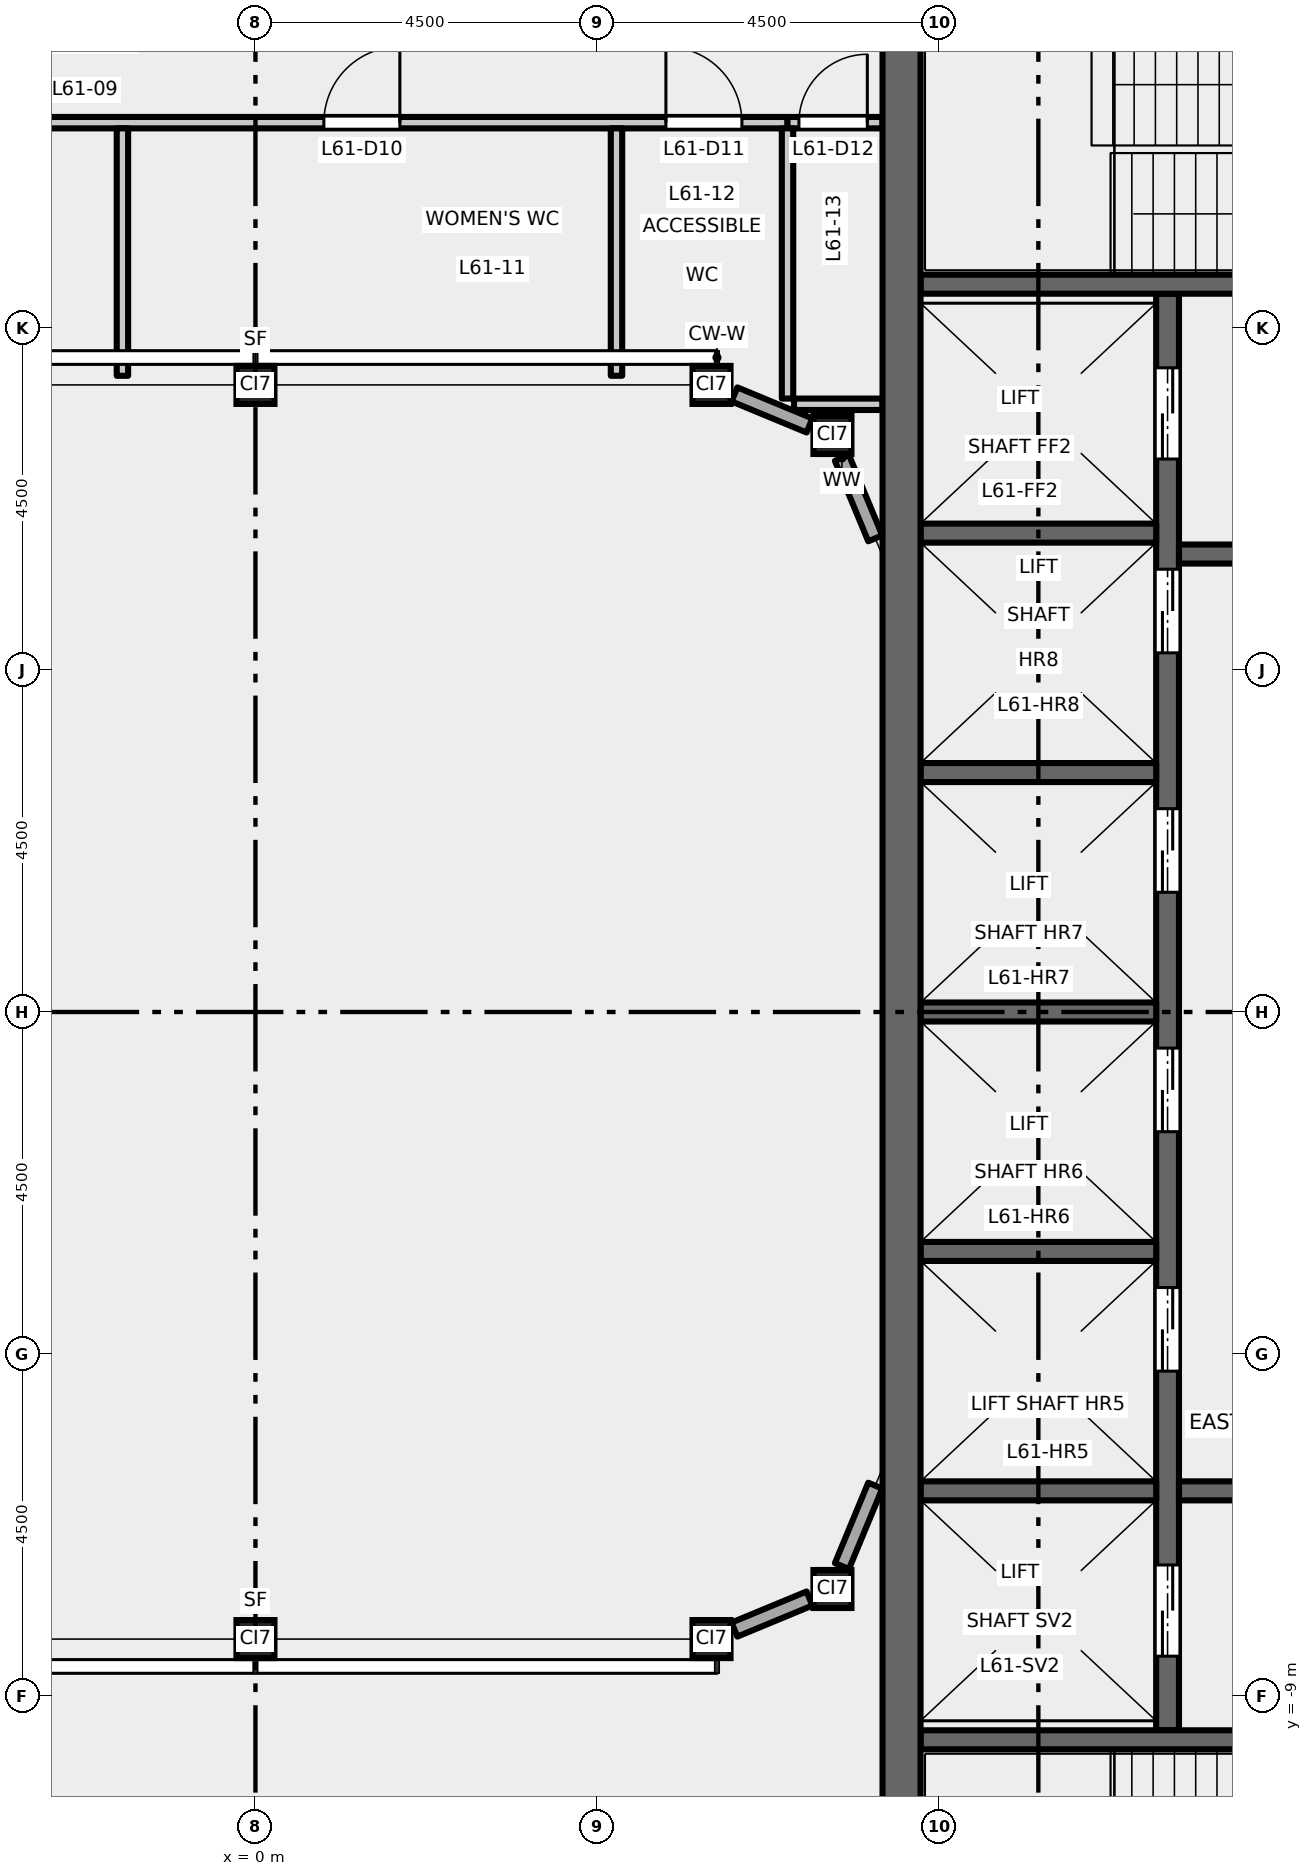
"""IFC4 building model, lengths in metres.
Left out: names, types, materials, properties, quantities, classifications, styles, units other than length and angle.
Written with IfcOpenShell. Run it as: python <this file> out.ifc"""

import sys

from ifc_helpers import new_model, si_unit, direction, frame, frame_2d, origin, origin_2d, place, context, subcontext, project, spatial, rectangle, hollow_rectangle, extrude, element, fill, save


model = new_model("IFC4")
c1 = context("Model", 3, precision=1e-05, world=origin(), true_north=direction((0.0, 1.0)))
c2 = subcontext(c1, "Body", "Model", "MODEL_VIEW")
j1 = project(units=[si_unit("LENGTHUNIT", "METRE"), si_unit("PLANEANGLEUNIT", "RADIAN")], contexts=[c1])
p1 = place(None, origin())
s1 = spatial("IfcSite", under=j1, at=p1, CompositionType="ELEMENT")
p2 = place(p1, origin())
s2 = spatial("IfcBuilding", under=s1, at=p2, CompositionType="ELEMENT")
p3 = place(p2, frame((0.0, 0.0, 284.2)))
s3 = spatial("IfcBuildingStorey", under=s2, at=p3, CompositionType="ELEMENT", Elevation=284.2)
for number, where, z_axis, x_axis in (
    (1, (0.0, -8.25, 0.0), (0.0, 0.0, 1.0), (1.0, 0.0, 0.0)),
    (2, (6.0, -8.25, 0.0), (0.0, 0.0, 1.0), (1.0, 0.0, 0.0)),
    (3, (7.591, -7.591, 0.0), (0.0, 0.0, 1.0), (1.0, 0.0, 0.0)),
    (4, (0.0, 8.25, 0.0), (0.0, 0.0, 1.0), (1.0, 0.0, 0.0)),
    (5, (6.0, 8.25, 0.0), (0.0, 0.0, 1.0), (1.0, 0.0, 0.0)),
    (6, (7.591, 7.591, 0.0), (0.0, 0.0, 1.0), (1.0, 0.0, 0.0)),
):
    element("IfcColumn", number, at=place(p3, frame(where, z_axis=z_axis, x_axis=x_axis)), inside=s3, PredefinedType="COLUMN", context=c2, shape_type="SweptSolid", body=[
        extrude(hollow_rectangle(XDim=0.5, YDim=0.5, WallThickness=0.025, at=origin_2d()), origin(), (0.0, 0.0, 1.0), 5.5),
    ])
p4 = place(p3, frame((12.0, -9.45, 0.0), z_axis=(0.0, 0.0, 1.0), x_axis=(0.0, 1.0, 0.0)))
e7 = element("IfcWall", 7, at=p4, inside=s3, PredefinedType="SHEAR", context=c2, shape_type="SweptSolid", body=[
    extrude(rectangle(XDim=18.9, YDim=0.3, at=frame_2d((9.45, 0.0))), origin(), (0.0, 0.0, 1.0), 5.35),
])
p5 = place(p4, frame((4.725, 0.0, 0.0)))
e8 = element("IfcOpeningElement", 8, at=p5, cuts=e7, PredefinedType="OPENING", context=c2, shape_type="SweptSolid", body=[
    extrude(rectangle(XDim=1.1, YDim=2.1, at=frame_2d((0.55, 1.05))), frame((0.0, 0.16, 0.0), z_axis=(0.0, -1.0, 0.0), x_axis=(1.0, 0.0, 0.0)), (0.0, 0.0, 1.0), 0.32),
])
p6 = place(p4, frame((7.875, 0.0, 0.0)))
e9 = element("IfcOpeningElement", 9, at=p6, cuts=e7, PredefinedType="OPENING", context=c2, shape_type="SweptSolid", body=[
    extrude(rectangle(XDim=1.1, YDim=2.1, at=frame_2d((0.55, 1.05))), frame((0.0, 0.16, 0.0), z_axis=(0.0, -1.0, 0.0), x_axis=(1.0, 0.0, 0.0)), (0.0, 0.0, 1.0), 0.32),
])
p7 = place(p4, frame((11.025, 0.0, 0.0)))
e10 = element("IfcOpeningElement", 10, at=p7, cuts=e7, PredefinedType="OPENING", context=c2, shape_type="SweptSolid", body=[
    extrude(rectangle(XDim=1.1, YDim=2.1, at=frame_2d((0.55, 1.05))), frame((0.0, 0.16, 0.0), z_axis=(0.0, -1.0, 0.0), x_axis=(1.0, 0.0, 0.0)), (0.0, 0.0, 1.0), 0.32),
])
p8 = place(p4, frame((14.175, 0.0, 0.0)))
e11 = element("IfcOpeningElement", 11, at=p8, cuts=e7, PredefinedType="OPENING", context=c2, shape_type="SweptSolid", body=[
    extrude(rectangle(XDim=1.1, YDim=2.1, at=frame_2d((0.55, 1.05))), frame((0.0, 0.16, 0.0), z_axis=(0.0, -1.0, 0.0), x_axis=(1.0, 0.0, 0.0)), (0.0, 0.0, 1.0), 0.32),
])
p9 = place(p4, frame((16.725, 0.0, 0.0)))
e12 = element("IfcOpeningElement", 12, at=p9, cuts=e7, PredefinedType="OPENING", context=c2, shape_type="SweptSolid", body=[
    extrude(rectangle(XDim=1.2, YDim=2.1, at=frame_2d((0.6, 1.05))), frame((0.0, 0.16, 0.0), z_axis=(0.0, -1.0, 0.0), x_axis=(1.0, 0.0, 0.0)), (0.0, 0.0, 1.0), 0.32),
])
p10 = place(p4, frame((0.975, 0.0, 0.0)))
e13 = element("IfcOpeningElement", 13, at=p10, cuts=e7, PredefinedType="OPENING", context=c2, shape_type="SweptSolid", body=[
    extrude(rectangle(XDim=1.2, YDim=2.1, at=frame_2d((0.6, 1.05))), frame((0.0, 0.16, 0.0), z_axis=(0.0, -1.0, 0.0), x_axis=(1.0, 0.0, 0.0)), (0.0, 0.0, 1.0), 0.32),
])
p11 = place(p3, frame((12.15, 6.025, 0.0), z_axis=(0.0, 0.0, 1.0), x_axis=(1.0, 0.0, 0.0)))
e14 = element("IfcWall", 14, at=p11, inside=s3, PredefinedType="SHEAR", context=c2, shape_type="SweptSolid", body=[
    extrude(rectangle(XDim=4.6, YDim=0.25, at=frame_2d((2.3, 0.0))), origin(), (0.0, 0.0, 1.0), 5.35),
])
p12 = place(p11, frame((1.8, 0.0, 0.0)))
e15 = element("IfcOpeningElement", 15, at=p12, cuts=e14, PredefinedType="OPENING", context=c2, shape_type="SweptSolid", body=[
    extrude(rectangle(XDim=1.0, YDim=2.1, at=frame_2d((0.5, 1.05))), frame((0.0, 0.135, 0.0), z_axis=(0.0, -1.0, 0.0), x_axis=(1.0, 0.0, 0.0)), (0.0, 0.0, 1.0), 0.27),
])
p13 = place(p3, frame((12.15, -6.3, 0.0), z_axis=(0.0, 0.0, 1.0), x_axis=(1.0, 0.0, 0.0)))
e16 = element("IfcWall", 16, at=p13, inside=s3, PredefinedType="SHEAR", context=c2, shape_type="SweptSolid", body=[
    extrude(rectangle(XDim=4.6, YDim=0.25, at=frame_2d((2.3, 0.0))), origin(), (0.0, 0.0, 1.0), 5.35),
])
p14 = place(p13, frame((1.8, 0.0, 0.0)))
e17 = element("IfcOpeningElement", 17, at=p14, cuts=e16, PredefinedType="OPENING", context=c2, shape_type="SweptSolid", body=[
    extrude(rectangle(XDim=1.0, YDim=2.1, at=frame_2d((0.5, 1.05))), frame((0.0, 0.135, 0.0), z_axis=(0.0, -1.0, 0.0), x_axis=(1.0, 0.0, 0.0)), (0.0, 0.0, 1.0), 0.27),
])
for number, where, z_axis, x_axis in (
    (18, (8.75, 0.0, 0.0), (0.0, 0.0, 1.0), (1.0, 0.0, 0.0)),
    (19, (8.75, 3.15, 0.0), (0.0, 0.0, 1.0), (1.0, 0.0, 0.0)),
    (20, (8.75, 6.3, 0.0), (0.0, 0.0, 1.0), (1.0, 0.0, 0.0)),
    (21, (8.75, -3.15, 0.0), (0.0, 0.0, 1.0), (1.0, 0.0, 0.0)),
    (22, (8.75, -6.3, 0.0), (0.0, 0.0, 1.0), (1.0, 0.0, 0.0)),
):
    element("IfcWall", number, at=place(p3, frame(where, z_axis=z_axis, x_axis=x_axis)), inside=s3, PredefinedType="SHEAR", context=c2, shape_type="SweptSolid", body=[
        extrude(rectangle(XDim=3.1, YDim=0.25, at=frame_2d((1.55, 0.0))), origin(), (0.0, 0.0, 1.0), 5.35),
    ])
p15 = place(p3, frame((8.75, 9.575, 0.0), z_axis=(0.0, 0.0, 1.0), x_axis=(1.0, 0.0, 0.0)))
e23 = element("IfcWall", 23, at=p15, inside=s3, PredefinedType="SHEAR", context=c2, shape_type="SweptSolid", body=[
    extrude(rectangle(XDim=8.0, YDim=0.25, at=frame_2d((4.0, 0.0))), origin(), (0.0, 0.0, 1.0), 5.35),
])
p16 = place(p15, frame((6.65, 0.0, 0.0)))
e24 = element("IfcOpeningElement", 24, at=p16, cuts=e23, PredefinedType="OPENING", context=c2, shape_type="SweptSolid", body=[
    extrude(rectangle(XDim=1.1, YDim=2.1, at=frame_2d((0.55, 1.05))), frame((0.0, 0.135, 0.0), z_axis=(0.0, -1.0, 0.0), x_axis=(1.0, 0.0, 0.0)), (0.0, 0.0, 1.0), 0.27),
])
p17 = place(p3, frame((8.75, -9.575, 0.0), z_axis=(0.0, 0.0, 1.0), x_axis=(1.0, 0.0, 0.0)))
e25 = element("IfcWall", 25, at=p17, inside=s3, PredefinedType="SHEAR", context=c2, shape_type="SweptSolid", body=[
    extrude(rectangle(XDim=8.0, YDim=0.25, at=frame_2d((4.0, 0.0))), origin(), (0.0, 0.0, 1.0), 5.35),
])
p18 = place(p17, frame((6.65, 0.0, 0.0)))
e26 = element("IfcOpeningElement", 26, at=p18, cuts=e25, PredefinedType="OPENING", context=c2, shape_type="SweptSolid", body=[
    extrude(rectangle(XDim=1.1, YDim=2.1, at=frame_2d((0.55, 1.05))), frame((0.0, 0.135, 0.0), z_axis=(0.0, -1.0, 0.0), x_axis=(1.0, 0.0, 0.0)), (0.0, 0.0, 1.0), 0.27),
])
p19 = place(p3, frame((8.5, -13.0, 0.0), z_axis=(0.0, 0.0, 1.0), x_axis=(0.0, 1.0, 0.0)))
e27 = element("IfcWall", 27, at=p19, inside=s3, PredefinedType="SHEAR", context=c2, shape_type="SweptSolid", body=[
    extrude(rectangle(XDim=26.0, YDim=0.5, at=frame_2d((13.0, 0.0))), origin(), (0.0, 0.0, 1.0), 5.35),
])
p20 = place(p3, frame((6.302, -8.125, 0.0), z_axis=(0.0, 0.0, 1.0), x_axis=(0.923919409248, 0.382587147216, 0.0)))
e28 = element("IfcWall", 28, at=p20, inside=s3, PredefinedType="STANDARD", context=c2, shape_type="SweptSolid", body=[
    extrude(rectangle(XDim=1.069, YDim=0.2, at=frame_2d((0.534, 0.0))), origin(), (0.0, 0.0, 1.0), 5.01),
])
for number, where, z_axis, x_axis in (
    (29, (7.716, -7.289, 0.0), (0.0, 0.0, 1.0), (0.383, 0.924, 0.0)),
    (30, (8.154, 6.231, 0.0), (0.0, 0.0, 1.0), (-0.383, 0.924, 0.0)),
):
    element("IfcWall", number, at=place(p3, frame(where, z_axis=z_axis, x_axis=x_axis)), inside=s3, PredefinedType="STANDARD", context=c2, shape_type="SweptSolid", body=[
        extrude(rectangle(XDim=1.146, YDim=0.2, at=frame_2d((0.573, 0.0))), origin(), (0.0, 0.0, 1.0), 5.01),
    ])
p21 = place(p3, frame((7.289, 7.716, 0.0), z_axis=(0.0, 0.0, 1.0), x_axis=(-0.923919409248, 0.382587147216, 0.0)))
e31 = element("IfcWall", 31, at=p21, inside=s3, PredefinedType="STANDARD", context=c2, shape_type="SweptSolid", body=[
    extrude(rectangle(XDim=1.069, YDim=0.2, at=frame_2d((0.534, 0.0))), origin(), (0.0, 0.0, 1.0), 5.01),
])
p22 = place(p3, frame((7.085, 7.995, 0.0), z_axis=(0.0, 0.0, 1.0), x_axis=(1.0, 0.0, 0.0)))
e32 = element("IfcWall", 32, at=p22, inside=s3, PredefinedType="PARTITIONING", context=c2, shape_type="SweptSolid", body=[
    extrude(rectangle(XDim=1.165, YDim=0.15, at=frame_2d((0.583, 0.0))), origin(), (0.0, 0.0, 1.0), 5.35),
])
p23 = place(p3, frame((-8.25, 11.7, 0.0), z_axis=(0.0, 0.0, 1.0), x_axis=(1.0, 0.0, 0.0)))
e33 = element("IfcWall", 33, at=p23, inside=s3, PredefinedType="PARTITIONING", context=c2, shape_type="SweptSolid", body=[
    extrude(rectangle(XDim=15.25, YDim=0.15, at=frame_2d((7.625, 0.0))), origin(), (0.0, 0.0, 1.0), 5.35),
])
p24 = place(p23, frame((2.65, 0.0, 0.0)))
e34 = element("IfcOpeningElement", 34, at=p24, cuts=e33, PredefinedType="OPENING", context=c2, shape_type="SweptSolid", body=[
    extrude(rectangle(XDim=1.0, YDim=2.1, at=frame_2d((0.5, 1.05))), frame((0.0, 0.085, 0.0), z_axis=(0.0, -1.0, 0.0), x_axis=(1.0, 0.0, 0.0)), (0.0, 0.0, 1.0), 0.17),
])
p25 = place(p23, frame((9.15, 0.0, 0.0)))
e35 = element("IfcOpeningElement", 35, at=p25, cuts=e33, PredefinedType="OPENING", context=c2, shape_type="SweptSolid", body=[
    extrude(rectangle(XDim=1.0, YDim=2.1, at=frame_2d((0.5, 1.05))), frame((0.0, 0.085, 0.0), z_axis=(0.0, -1.0, 0.0), x_axis=(1.0, 0.0, 0.0)), (0.0, 0.0, 1.0), 0.17),
])
p26 = place(p23, frame((13.65, 0.0, 0.0)))
e36 = element("IfcOpeningElement", 36, at=p26, cuts=e33, PredefinedType="OPENING", context=c2, shape_type="SweptSolid", body=[
    extrude(rectangle(XDim=1.0, YDim=2.1, at=frame_2d((0.5, 1.05))), frame((0.0, 0.085, 0.0), z_axis=(0.0, -1.0, 0.0), x_axis=(1.0, 0.0, 0.0)), (0.0, 0.0, 1.0), 0.17),
])
p27 = place(p3, frame((7.0, 11.7, 0.0), z_axis=(0.0, 0.0, 1.0), x_axis=(1.0, 0.0, 0.0)))
e37 = element("IfcWall", 37, at=p27, inside=s3, PredefinedType="PARTITIONING", context=c2, shape_type="SweptSolid", body=[
    extrude(rectangle(XDim=1.25, YDim=0.15, at=frame_2d((0.625, 0.0))), origin(), (0.0, 0.0, 1.0), 5.35),
])
p28 = place(p27, frame((0.15, 0.0, 0.0)))
e38 = element("IfcOpeningElement", 38, at=p28, cuts=e37, PredefinedType="OPENING", context=c2, shape_type="SweptSolid", body=[
    extrude(rectangle(XDim=0.9, YDim=2.1, at=frame_2d((0.45, 1.05))), frame((0.0, 0.085, 0.0), z_axis=(0.0, -1.0, 0.0), x_axis=(1.0, 0.0, 0.0)), (0.0, 0.0, 1.0), 0.17),
])
for number, where, z_axis, x_axis in (
    (39, (-1.75, 8.37, 0.0), (0.0, 0.0, 1.0), (0.0, 1.0, 0.0)),
    (40, (4.75, 8.37, 0.0), (0.0, 0.0, 1.0), (0.0, 1.0, 0.0)),
):
    element("IfcWall", number, at=place(p3, frame(where, z_axis=z_axis, x_axis=x_axis)), inside=s3, PredefinedType="PARTITIONING", context=c2, shape_type="SweptSolid", body=[
        extrude(rectangle(XDim=3.255, YDim=0.15, at=frame_2d((1.627, 0.0))), origin(), (0.0, 0.0, 1.0), 5.35),
    ])
p29 = place(p3, frame((7.0, 8.07, 0.0), z_axis=(0.0, 0.0, 1.0), x_axis=(0.0, 1.0, 0.0)))
e41 = element("IfcWall", 41, at=p29, inside=s3, PredefinedType="PARTITIONING", context=c2, shape_type="SweptSolid", body=[
    extrude(rectangle(XDim=3.555, YDim=0.15, at=frame_2d((1.777, 0.0))), origin(), (0.0, 0.0, 1.0), 5.35),
])
p30 = place(p5, origin())
e42 = element("IfcDoor", 42, at=p30, inside=s3, OperationType="DOUBLE_DOOR_SLIDING", PredefinedType="DOOR", context=c2, shape_type="SweptSolid", body=[
    extrude(rectangle(XDim=1.1, YDim=2.1, at=frame_2d((0.55, 1.05))), frame((0.0, 0.025, 0.0), z_axis=(0.0, -1.0, 0.0), x_axis=(1.0, 0.0, 0.0)), (0.0, 0.0, 1.0), 0.05),
])
fill(e8, e42)
p31 = place(p6, origin())
e43 = element("IfcDoor", 43, at=p31, inside=s3, OperationType="DOUBLE_DOOR_SLIDING", PredefinedType="DOOR", context=c2, shape_type="SweptSolid", body=[
    extrude(rectangle(XDim=1.1, YDim=2.1, at=frame_2d((0.55, 1.05))), frame((0.0, 0.025, 0.0), z_axis=(0.0, -1.0, 0.0), x_axis=(1.0, 0.0, 0.0)), (0.0, 0.0, 1.0), 0.05),
])
fill(e9, e43)
p32 = place(p7, origin())
e44 = element("IfcDoor", 44, at=p32, inside=s3, OperationType="DOUBLE_DOOR_SLIDING", PredefinedType="DOOR", context=c2, shape_type="SweptSolid", body=[
    extrude(rectangle(XDim=1.1, YDim=2.1, at=frame_2d((0.55, 1.05))), frame((0.0, 0.025, 0.0), z_axis=(0.0, -1.0, 0.0), x_axis=(1.0, 0.0, 0.0)), (0.0, 0.0, 1.0), 0.05),
])
fill(e10, e44)
p33 = place(p8, origin())
e45 = element("IfcDoor", 45, at=p33, inside=s3, OperationType="DOUBLE_DOOR_SLIDING", PredefinedType="DOOR", context=c2, shape_type="SweptSolid", body=[
    extrude(rectangle(XDim=1.1, YDim=2.1, at=frame_2d((0.55, 1.05))), frame((0.0, 0.025, 0.0), z_axis=(0.0, -1.0, 0.0), x_axis=(1.0, 0.0, 0.0)), (0.0, 0.0, 1.0), 0.05),
])
fill(e11, e45)
p34 = place(p9, origin())
e46 = element("IfcDoor", 46, at=p34, inside=s3, OperationType="DOUBLE_DOOR_SLIDING", PredefinedType="DOOR", context=c2, shape_type="SweptSolid", body=[
    extrude(rectangle(XDim=1.2, YDim=2.1, at=frame_2d((0.6, 1.05))), frame((0.0, 0.025, 0.0), z_axis=(0.0, -1.0, 0.0), x_axis=(1.0, 0.0, 0.0)), (0.0, 0.0, 1.0), 0.05),
])
fill(e12, e46)
p35 = place(p10, origin())
e47 = element("IfcDoor", 47, at=p35, inside=s3, OperationType="DOUBLE_DOOR_SLIDING", PredefinedType="DOOR", context=c2, shape_type="SweptSolid", body=[
    extrude(rectangle(XDim=1.2, YDim=2.1, at=frame_2d((0.6, 1.05))), frame((0.0, 0.025, 0.0), z_axis=(0.0, -1.0, 0.0), x_axis=(1.0, 0.0, 0.0)), (0.0, 0.0, 1.0), 0.05),
])
fill(e13, e47)
p36 = place(p25, origin())
e48 = element("IfcDoor", 48, at=p36, inside=s3, OperationType="SINGLE_SWING_RIGHT", PredefinedType="DOOR", context=c2, shape_type="SweptSolid", body=[
    extrude(rectangle(XDim=1.0, YDim=2.1, at=frame_2d((0.5, 1.05))), frame((0.0, 0.025, 0.0), z_axis=(0.0, -1.0, 0.0), x_axis=(1.0, 0.0, 0.0)), (0.0, 0.0, 1.0), 0.05),
])
fill(e35, e48)
p37 = place(p26, origin())
e49 = element("IfcDoor", 49, at=p37, inside=s3, OperationType="SINGLE_SWING_LEFT", PredefinedType="DOOR", context=c2, shape_type="SweptSolid", body=[
    extrude(rectangle(XDim=1.0, YDim=2.1, at=frame_2d((0.5, 1.05))), frame((0.0, 0.025, 0.0), z_axis=(0.0, -1.0, 0.0), x_axis=(1.0, 0.0, 0.0)), (0.0, 0.0, 1.0), 0.05),
])
fill(e36, e49)
p38 = place(p28, origin())
e50 = element("IfcDoor", 50, at=p38, inside=s3, OperationType="SINGLE_SWING_RIGHT", PredefinedType="DOOR", context=c2, shape_type="SweptSolid", body=[
    extrude(rectangle(XDim=0.9, YDim=2.1, at=frame_2d((0.45, 1.05))), frame((0.0, 0.025, 0.0), z_axis=(0.0, -1.0, 0.0), x_axis=(1.0, 0.0, 0.0)), (0.0, 0.0, 1.0), 0.05),
])
fill(e38, e50)
save(model, sys.argv[1])
